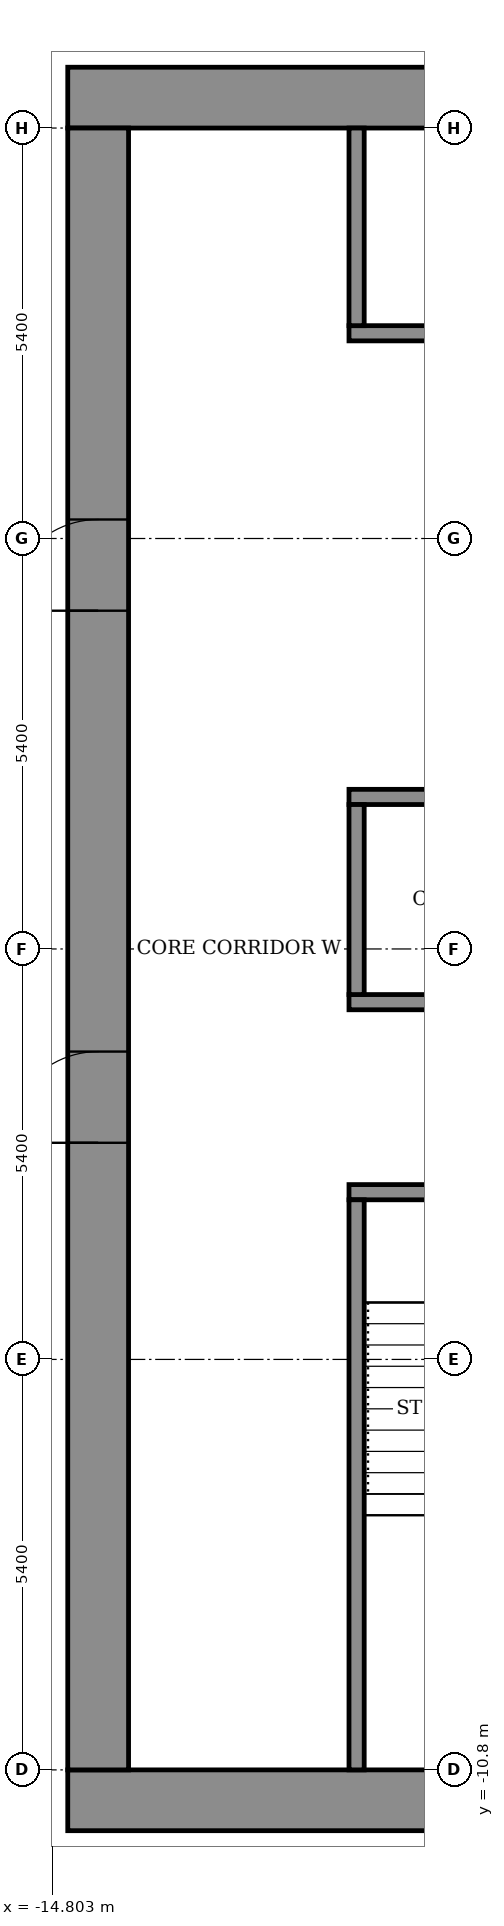
"""IFC4 building model, lengths in metres.
Left out: names, types, materials, properties, quantities, classifications, styles, units other than length and angle.
Written with IfcOpenShell. Run it as: python <this file> out.ifc"""

import sys

from ifc_helpers import new_model, si_unit, direction, frame, frame_2d, origin, place, context, subcontext, project, spatial, rectangle, extrude, element, fill, save


model = new_model("IFC4")
c1 = context("Model", 3, precision=1e-05, world=origin(), true_north=direction((0.0, 1.0)))
c2 = subcontext(c1, "Body", "Model", "MODEL_VIEW")
j1 = project(units=[si_unit("LENGTHUNIT", "METRE"), si_unit("PLANEANGLEUNIT", "RADIAN")], contexts=[c1])
p1 = place(None, origin())
s1 = spatial("IfcSite", under=j1, at=p1, CompositionType="ELEMENT")
p2 = place(p1, origin())
s2 = spatial("IfcBuilding", under=s1, at=p2, CompositionType="ELEMENT")
p3 = place(p2, frame((0.0, 0.0, 241.9)))
s3 = spatial("IfcBuildingStorey", under=s2, at=p3, CompositionType="ELEMENT", Elevation=241.9)
for number, where, z_axis, x_axis in (
    (1, (-14.6, -11.2, 0.0), (0.0, 0.0, 1.0), (1.0, 0.0, 0.0)),
    (2, (-14.6, 11.2, 0.0), (0.0, 0.0, 1.0), (1.0, 0.0, 0.0)),
):
    element("IfcWall", number, at=place(p3, frame(where, z_axis=z_axis, x_axis=x_axis)), inside=s3, PredefinedType="SHEAR", context=c2, shape_type="SweptSolid", body=[
        extrude(rectangle(XDim=29.2, YDim=0.8, at=frame_2d((14.6, 0.0))), origin(), (0.0, 0.0, 1.0), 3.6),
    ])
p4 = place(p3, frame((-14.2, -10.8, 0.0), z_axis=(0.0, 0.0, 1.0), x_axis=(0.0, 1.0, 0.0)))
e3 = element("IfcWall", 3, at=p4, inside=s3, PredefinedType="SHEAR", context=c2, shape_type="SweptSolid", body=[
    extrude(rectangle(XDim=21.6, YDim=0.8, at=frame_2d((10.8, 0.0))), origin(), (0.0, 0.0, 1.0), 3.6),
])
p5 = place(p4, frame((8.25, 0.0, 0.0)))
e4 = element("IfcOpeningElement", 4, at=p5, cuts=e3, PredefinedType="OPENING", context=c2, shape_type="SweptSolid", body=[
    extrude(rectangle(XDim=1.2, YDim=2.1, at=frame_2d((0.6, 1.05))), frame((0.0, 0.41, 0.0), z_axis=(0.0, -1.0, 0.0), x_axis=(1.0, 0.0, 0.0)), (0.0, 0.0, 1.0), 0.82),
])
p6 = place(p4, frame((15.25, 0.0, 0.0)))
e5 = element("IfcOpeningElement", 5, at=p6, cuts=e3, PredefinedType="OPENING", context=c2, shape_type="SweptSolid", body=[
    extrude(rectangle(XDim=1.2, YDim=2.1, at=frame_2d((0.6, 1.05))), frame((0.0, 0.41, 0.0), z_axis=(0.0, -1.0, 0.0), x_axis=(1.0, 0.0, 0.0)), (0.0, 0.0, 1.0), 0.82),
])
p7 = place(p3, frame((-10.9, -3.2, 0.0), z_axis=(0.0, 0.0, 1.0), x_axis=(1.0, 0.0, 0.0)))
e6 = element("IfcWall", 6, at=p7, inside=s3, PredefinedType="SHEAR", context=c2, shape_type="SweptSolid", body=[
    extrude(rectangle(XDim=21.8, YDim=0.2, at=frame_2d((10.9, 0.0))), origin(), (0.0, 0.0, 1.0), 3.05),
])
p8 = place(p7, frame((1.075, 0.0, 0.0)))
e7 = element("IfcOpeningElement", 7, at=p8, cuts=e6, PredefinedType="OPENING", context=c2, shape_type="SweptSolid", body=[
    extrude(rectangle(XDim=1.1, YDim=2.1, at=frame_2d((0.55, 1.05))), frame((0.0, 0.11, 0.0), z_axis=(0.0, -1.0, 0.0), x_axis=(1.0, 0.0, 0.0)), (0.0, 0.0, 1.0), 0.22),
])
p9 = place(p7, frame((10.325, 0.0, 0.0)))
e8 = element("IfcOpeningElement", 8, at=p9, cuts=e6, PredefinedType="OPENING", context=c2, shape_type="SweptSolid", body=[
    extrude(rectangle(XDim=1.1, YDim=2.1, at=frame_2d((0.55, 1.05))), frame((0.0, 0.11, 0.0), z_axis=(0.0, -1.0, 0.0), x_axis=(1.0, 0.0, 0.0)), (0.0, 0.0, 1.0), 0.22),
])
p10 = place(p7, frame((19.625, 0.0, 0.0)))
e9 = element("IfcOpeningElement", 9, at=p10, cuts=e6, PredefinedType="OPENING", context=c2, shape_type="SweptSolid", body=[
    extrude(rectangle(XDim=1.1, YDim=2.1, at=frame_2d((0.55, 1.05))), frame((0.0, 0.11, 0.0), z_axis=(0.0, -1.0, 0.0), x_axis=(1.0, 0.0, 0.0)), (0.0, 0.0, 1.0), 0.22),
])
p11 = place(p7, frame((5.7, 0.0, 0.0)))
e10 = element("IfcOpeningElement", 10, at=p11, cuts=e6, PredefinedType="OPENING", context=c2, shape_type="SweptSolid", body=[
    extrude(rectangle(XDim=1.1, YDim=2.1, at=frame_2d((0.55, 1.05))), frame((0.0, 0.11, 0.0), z_axis=(0.0, -1.0, 0.0), x_axis=(1.0, 0.0, 0.0)), (0.0, 0.0, 1.0), 0.22),
])
p12 = place(p7, frame((14.975, 0.0, 0.0)))
e11 = element("IfcOpeningElement", 11, at=p12, cuts=e6, PredefinedType="OPENING", context=c2, shape_type="SweptSolid", body=[
    extrude(rectangle(XDim=1.1, YDim=2.1, at=frame_2d((0.55, 1.05))), frame((0.0, 0.11, 0.0), z_axis=(0.0, -1.0, 0.0), x_axis=(1.0, 0.0, 0.0)), (0.0, 0.0, 1.0), 0.22),
])
p13 = place(p3, frame((-10.9, -0.7, 0.0), z_axis=(0.0, 0.0, 1.0), x_axis=(1.0, 0.0, 0.0)))
e12 = element("IfcWall", 12, at=p13, inside=s3, PredefinedType="SHEAR", context=c2, shape_type="SweptSolid", body=[
    extrude(rectangle(XDim=21.8, YDim=0.2, at=frame_2d((10.9, 0.0))), origin(), (0.0, 0.0, 1.0), 3.05),
])
p14 = place(p3, frame((-10.9, 2.0, 0.0), z_axis=(0.0, 0.0, 1.0), x_axis=(1.0, 0.0, 0.0)))
e13 = element("IfcWall", 13, at=p14, inside=s3, PredefinedType="SHEAR", context=c2, shape_type="SweptSolid", body=[
    extrude(rectangle(XDim=21.8, YDim=0.2, at=frame_2d((10.9, 0.0))), origin(), (0.0, 0.0, 1.0), 3.05),
])
p15 = place(p14, frame((4.95, 0.0, 0.0)))
e14 = element("IfcOpeningElement", 14, at=p15, cuts=e13, PredefinedType="OPENING", context=c2, shape_type="SweptSolid", body=[
    extrude(rectangle(XDim=1.1, YDim=2.1, at=frame_2d((0.55, 1.05))), frame((0.0, 0.11, 0.0), z_axis=(0.0, -1.0, 0.0), x_axis=(1.0, 0.0, 0.0)), (0.0, 0.0, 1.0), 0.22),
])
p16 = place(p14, frame((7.65, 0.0, 0.0)))
e15 = element("IfcOpeningElement", 15, at=p16, cuts=e13, PredefinedType="OPENING", context=c2, shape_type="SweptSolid", body=[
    extrude(rectangle(XDim=1.1, YDim=2.1, at=frame_2d((0.55, 1.05))), frame((0.0, 0.11, 0.0), z_axis=(0.0, -1.0, 0.0), x_axis=(1.0, 0.0, 0.0)), (0.0, 0.0, 1.0), 0.22),
])
p17 = place(p14, frame((10.35, 0.0, 0.0)))
e16 = element("IfcOpeningElement", 16, at=p17, cuts=e13, PredefinedType="OPENING", context=c2, shape_type="SweptSolid", body=[
    extrude(rectangle(XDim=1.1, YDim=2.1, at=frame_2d((0.55, 1.05))), frame((0.0, 0.11, 0.0), z_axis=(0.0, -1.0, 0.0), x_axis=(1.0, 0.0, 0.0)), (0.0, 0.0, 1.0), 0.22),
])
p18 = place(p14, frame((1.675, 0.0, 0.0)))
e17 = element("IfcOpeningElement", 17, at=p18, cuts=e13, PredefinedType="OPENING", context=c2, shape_type="SweptSolid", body=[
    extrude(rectangle(XDim=0.9, YDim=2.1, at=frame_2d((0.45, 1.05))), frame((0.0, 0.11, 0.0), z_axis=(0.0, -1.0, 0.0), x_axis=(1.0, 0.0, 0.0)), (0.0, 0.0, 1.0), 0.22),
])
p19 = place(p14, frame((14.5, 0.0, 0.0)))
e18 = element("IfcOpeningElement", 18, at=p19, cuts=e13, PredefinedType="OPENING", context=c2, shape_type="SweptSolid", body=[
    extrude(rectangle(XDim=0.9, YDim=2.1, at=frame_2d((0.45, 1.05))), frame((0.0, 0.11, 0.0), z_axis=(0.0, -1.0, 0.0), x_axis=(1.0, 0.0, 0.0)), (0.0, 0.0, 1.0), 0.22),
])
p20 = place(p14, frame((19.225, 0.0, 0.0)))
e19 = element("IfcOpeningElement", 19, at=p20, cuts=e13, PredefinedType="OPENING", context=c2, shape_type="SweptSolid", body=[
    extrude(rectangle(XDim=0.9, YDim=2.1, at=frame_2d((0.45, 1.05))), frame((0.0, 0.11, 0.0), z_axis=(0.0, -1.0, 0.0), x_axis=(1.0, 0.0, 0.0)), (0.0, 0.0, 1.0), 0.22),
])
p21 = place(p3, frame((-10.9, 8.1, 0.0), z_axis=(0.0, 0.0, 1.0), x_axis=(1.0, 0.0, 0.0)))
e20 = element("IfcWall", 20, at=p21, inside=s3, PredefinedType="SHEAR", context=c2, shape_type="SweptSolid", body=[
    extrude(rectangle(XDim=21.8, YDim=0.2, at=frame_2d((10.9, 0.0))), origin(), (0.0, 0.0, 1.0), 3.05),
])
p22 = place(p21, frame((4.95, 0.0, 0.0)))
e21 = element("IfcOpeningElement", 21, at=p22, cuts=e20, PredefinedType="OPENING", context=c2, shape_type="SweptSolid", body=[
    extrude(rectangle(XDim=1.1, YDim=2.1, at=frame_2d((0.55, 1.05))), frame((0.0, 0.11, 0.0), z_axis=(0.0, -1.0, 0.0), x_axis=(1.0, 0.0, 0.0)), (0.0, 0.0, 1.0), 0.22),
])
p23 = place(p21, frame((7.65, 0.0, 0.0)))
e22 = element("IfcOpeningElement", 22, at=p23, cuts=e20, PredefinedType="OPENING", context=c2, shape_type="SweptSolid", body=[
    extrude(rectangle(XDim=1.1, YDim=2.1, at=frame_2d((0.55, 1.05))), frame((0.0, 0.11, 0.0), z_axis=(0.0, -1.0, 0.0), x_axis=(1.0, 0.0, 0.0)), (0.0, 0.0, 1.0), 0.22),
])
p24 = place(p21, frame((10.35, 0.0, 0.0)))
e23 = element("IfcOpeningElement", 23, at=p24, cuts=e20, PredefinedType="OPENING", context=c2, shape_type="SweptSolid", body=[
    extrude(rectangle(XDim=1.1, YDim=2.1, at=frame_2d((0.55, 1.05))), frame((0.0, 0.11, 0.0), z_axis=(0.0, -1.0, 0.0), x_axis=(1.0, 0.0, 0.0)), (0.0, 0.0, 1.0), 0.22),
])
p25 = place(p21, frame((1.675, 0.0, 0.0)))
e24 = element("IfcOpeningElement", 24, at=p25, cuts=e20, PredefinedType="OPENING", context=c2, shape_type="SweptSolid", body=[
    extrude(rectangle(XDim=0.9, YDim=2.1, at=frame_2d((0.45, 1.05))), frame((0.0, 0.11, 0.0), z_axis=(0.0, -1.0, 0.0), x_axis=(1.0, 0.0, 0.0)), (0.0, 0.0, 1.0), 0.22),
])
p26 = place(p21, frame((14.5, 0.0, 0.0)))
e25 = element("IfcOpeningElement", 25, at=p26, cuts=e20, PredefinedType="OPENING", context=c2, shape_type="SweptSolid", body=[
    extrude(rectangle(XDim=0.9, YDim=2.1, at=frame_2d((0.45, 1.05))), frame((0.0, 0.11, 0.0), z_axis=(0.0, -1.0, 0.0), x_axis=(1.0, 0.0, 0.0)), (0.0, 0.0, 1.0), 0.22),
])
p27 = place(p21, frame((19.225, 0.0, 0.0)))
e26 = element("IfcOpeningElement", 26, at=p27, cuts=e20, PredefinedType="OPENING", context=c2, shape_type="SweptSolid", body=[
    extrude(rectangle(XDim=0.9, YDim=2.1, at=frame_2d((0.45, 1.05))), frame((0.0, 0.11, 0.0), z_axis=(0.0, -1.0, 0.0), x_axis=(1.0, 0.0, 0.0)), (0.0, 0.0, 1.0), 0.22),
])
p28 = place(p3, frame((-10.8, -10.8, 0.0), z_axis=(0.0, 0.0, 1.0), x_axis=(0.0, 1.0, 0.0)))
e27 = element("IfcWall", 27, at=p28, inside=s3, PredefinedType="SHEAR", context=c2, shape_type="SweptSolid", body=[
    extrude(rectangle(XDim=7.5, YDim=0.2, at=frame_2d((3.75, 0.0))), origin(), (0.0, 0.0, 1.0), 3.05),
])
p29 = place(p3, frame((-10.8, -0.6, 0.0), z_axis=(0.0, 0.0, 1.0), x_axis=(0.0, 1.0, 0.0)))
e28 = element("IfcWall", 28, at=p29, inside=s3, PredefinedType="STANDARD", context=c2, shape_type="SweptSolid", body=[
    extrude(rectangle(XDim=2.5, YDim=0.2, at=frame_2d((1.25, 0.0))), origin(), (0.0, 0.0, 1.0), 3.05),
])
p30 = place(p3, frame((-10.8, 8.2, 0.0), z_axis=(0.0, 0.0, 1.0), x_axis=(0.0, 1.0, 0.0)))
e29 = element("IfcWall", 29, at=p30, inside=s3, PredefinedType="STANDARD", context=c2, shape_type="SweptSolid", body=[
    extrude(rectangle(XDim=2.6, YDim=0.2, at=frame_2d((1.3, 0.0))), origin(), (0.0, 0.0, 1.0), 3.05),
])
p31 = place(p5, origin())
e30 = element("IfcDoor", 30, at=p31, inside=s3, OperationType="DOUBLE_DOOR_SINGLE_SWING", PredefinedType="DOOR", context=c2, shape_type="SweptSolid", body=[
    extrude(rectangle(XDim=1.2, YDim=2.1, at=frame_2d((0.6, 1.05))), frame((0.0, 0.025, 0.0), z_axis=(0.0, -1.0, 0.0), x_axis=(1.0, 0.0, 0.0)), (0.0, 0.0, 1.0), 0.05),
])
fill(e4, e30)
p32 = place(p6, origin())
e31 = element("IfcDoor", 31, at=p32, inside=s3, OperationType="DOUBLE_DOOR_SINGLE_SWING", PredefinedType="DOOR", context=c2, shape_type="SweptSolid", body=[
    extrude(rectangle(XDim=1.2, YDim=2.1, at=frame_2d((0.6, 1.05))), frame((0.0, 0.025, 0.0), z_axis=(0.0, -1.0, 0.0), x_axis=(1.0, 0.0, 0.0)), (0.0, 0.0, 1.0), 0.05),
])
fill(e5, e31)
save(model, sys.argv[1])
